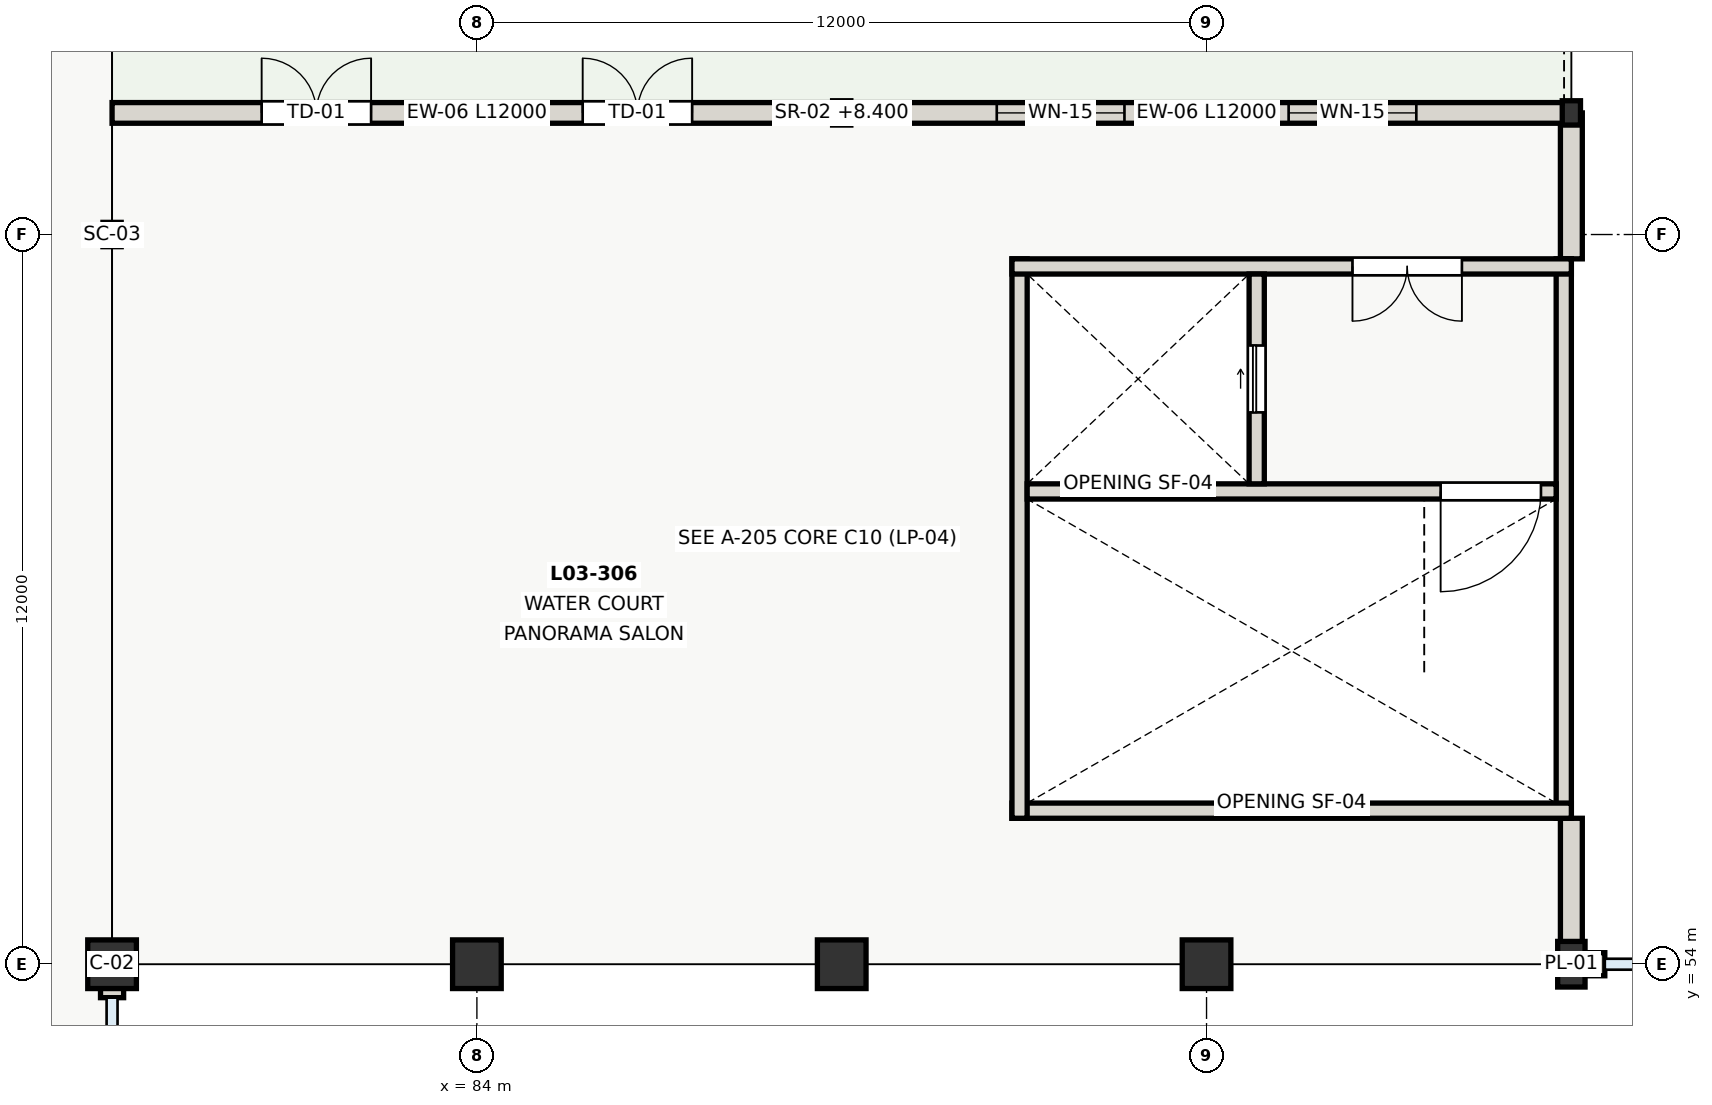
"""IFC4 building model, lengths in metres.
Left out: names, types, materials, properties, quantities, classifications, styles, units other than length and angle.
Written with IfcOpenShell. Run it as: python <this file> out.ifc"""

import sys

from ifc_helpers import new_model, si_unit, direction, frame, frame_2d, origin, origin_2d, place, context, subcontext, project, spatial, rectangle, i_section, extrude, element, fill, save


model = new_model("IFC4")
c1 = context("Model", 3, precision=1e-05, world=origin(), true_north=direction((0.0, 1.0)))
c2 = subcontext(c1, "Body", "Model", "MODEL_VIEW")
j1 = project(units=[si_unit("LENGTHUNIT", "METRE"), si_unit("PLANEANGLEUNIT", "RADIAN")], contexts=[c1])
p1 = place(None, origin())
s1 = spatial("IfcSite", under=j1, at=p1, CompositionType="ELEMENT")
p2 = place(p1, origin())
s2 = spatial("IfcBuilding", under=s1, at=p2, CompositionType="ELEMENT")
p3 = place(p2, frame((0.0, 0.0, 8.4)))
s3 = spatial("IfcBuildingStorey", under=s2, at=p3, CompositionType="ELEMENT", Elevation=8.4)
for number, where, z_axis, x_axis in (
    (1, (78.0, 54.0, 0.0), (0.0, 0.0, 1.0), (1.0, 0.0, 0.0)),
    (2, (84.0, 54.0, 0.0), (0.0, 0.0, 1.0), (1.0, 0.0, 0.0)),
    (3, (90.0, 54.0, 0.0), (0.0, 0.0, 1.0), (1.0, 0.0, 0.0)),
    (4, (96.0, 54.0, 0.0), (0.0, 0.0, 1.0), (1.0, 0.0, 0.0)),
):
    element("IfcColumn", number, at=place(p3, frame(where, z_axis=z_axis, x_axis=x_axis)), inside=s3, PredefinedType="COLUMN", context=c2, shape_type="SweptSolid", body=[
        extrude(rectangle(XDim=0.8, YDim=0.8, at=origin_2d()), origin(), (0.0, 0.0, 1.0), 4.8),
    ])
p4 = place(p3, frame((102.0, 54.0, 0.0), z_axis=(0.0, 0.0, 1.0), x_axis=(1.0, 0.0, 0.0)))
e5 = element("IfcColumn", 5, at=p4, inside=s3, PredefinedType="PILASTER", context=c2, shape_type="SweptSolid", body=[
    extrude(rectangle(XDim=0.45, YDim=0.75, at=origin_2d()), origin(), (0.0, 0.0, 1.0), 4.8),
])
for number, where, z_axis, x_axis in (
    (6, (78.0, 66.0, 0.0), (0.0, 0.0, 1.0), (1.0, 0.0, 0.0)),
    (7, (90.0, 68.0, 0.0), (0.0, 0.0, 1.0), (1.0, 0.0, 0.0)),
    (8, (102.0, 68.0, 0.0), (0.0, 0.0, 1.0), (1.0, 0.0, 0.0)),
):
    element("IfcColumn", number, at=place(p3, frame(where, z_axis=z_axis, x_axis=x_axis)), inside=s3, PredefinedType="COLUMN", context=c2, shape_type="SweptSolid", body=[
        extrude(i_section(OverallWidth=0.3, OverallDepth=0.4, WebThickness=0.013, FlangeThickness=0.024, at=origin_2d()), origin(), (0.0, 0.0, 1.0), 4.2),
    ])
p5 = place(p3, frame((102.182, 54.0, 0.0), z_axis=(0.0, 0.0, 1.0), x_axis=(1.0, 0.0, 0.0)))
e9 = element("IfcWall", 9, at=p5, inside=s3, PredefinedType="SOLIDWALL", context=c2, shape_type="SweptSolid", body=[
    extrude(rectangle(XDim=0.368, YDim=0.38, at=frame_2d((0.184, 0.0))), origin(), (0.0, 0.0, 1.0), 3.56),
])
p6 = place(p3, frame((78.0, 53.45, 0.0), z_axis=(0.0, 0.0, 1.0), x_axis=(0.0, 1.0, 0.0)))
e10 = element("IfcWall", 10, at=p6, inside=s3, PredefinedType="SOLIDWALL", context=c2, shape_type="SweptSolid", body=[
    extrude(rectangle(XDim=0.55, YDim=0.38, at=frame_2d((0.275, 0.0))), origin(), (0.0, 0.0, 1.0), 4.8),
])
for number, where, z_axis, x_axis in (
    (11, (102.0, 56.4, 0.0), (0.0, 0.0, 1.0), (0.0, -1.0, 0.0)),
    (12, (102.0, 68.0, 0.0), (0.0, 0.0, 1.0), (0.0, -1.0, 0.0)),
):
    element("IfcWall", number, at=place(p3, frame(where, z_axis=z_axis, x_axis=x_axis)), inside=s3, PredefinedType="SOLIDWALL", context=c2, shape_type="SweptSolid", body=[
        extrude(rectangle(XDim=2.4, YDim=0.36, at=frame_2d((1.2, 0.0))), origin(), (0.0, 0.0, 1.0), 4.2),
    ])
p7 = place(p3, frame((78.0, 68.0, 0.0), z_axis=(0.0, 0.0, 1.0), x_axis=(1.0, 0.0, 0.0)))
e13 = element("IfcWall", 13, at=p7, inside=s3, PredefinedType="SOLIDWALL", context=c2, shape_type="SweptSolid", body=[
    extrude(rectangle(XDim=12.0, YDim=0.34, at=frame_2d((6.0, 0.0))), origin(), (0.0, 0.0, 1.0), 4.2),
])
p8 = place(p7, frame((2.46, 0.0, 0.0)))
e14 = element("IfcOpeningElement", 14, at=p8, cuts=e13, PredefinedType="OPENING", context=c2, shape_type="SweptSolid", body=[
    extrude(rectangle(XDim=1.8, YDim=2.2, at=frame_2d((0.9, 1.1))), frame((0.0, 0.18, 0.0), z_axis=(0.0, -1.0, 0.0), x_axis=(1.0, 0.0, 0.0)), (0.0, 0.0, 1.0), 0.36),
])
p9 = place(p7, frame((7.74, 0.0, 0.0)))
e15 = element("IfcOpeningElement", 15, at=p9, cuts=e13, PredefinedType="OPENING", context=c2, shape_type="SweptSolid", body=[
    extrude(rectangle(XDim=1.8, YDim=2.2, at=frame_2d((0.9, 1.1))), frame((0.0, 0.18, 0.0), z_axis=(0.0, -1.0, 0.0), x_axis=(1.0, 0.0, 0.0)), (0.0, 0.0, 1.0), 0.36),
])
p10 = place(p3, frame((90.0, 68.0, 0.0), z_axis=(0.0, 0.0, 1.0), x_axis=(1.0, 0.0, 0.0)))
e16 = element("IfcWall", 16, at=p10, inside=s3, PredefinedType="SOLIDWALL", context=c2, shape_type="SweptSolid", body=[
    extrude(rectangle(XDim=12.0, YDim=0.34, at=frame_2d((6.0, 0.0))), origin(), (0.0, 0.0, 1.0), 4.2),
])
p11 = place(p10, frame((2.55, 0.0, 0.9)))
e17 = element("IfcOpeningElement", 17, at=p11, cuts=e16, PredefinedType="OPENING", context=c2, shape_type="SweptSolid", body=[
    extrude(rectangle(XDim=2.1, YDim=1.95, at=frame_2d((1.05, 0.975))), frame((0.0, 0.18, 0.0), z_axis=(0.0, -1.0, 0.0), x_axis=(1.0, 0.0, 0.0)), (0.0, 0.0, 1.0), 0.36),
])
p12 = place(p10, frame((7.35, 0.0, 0.9)))
e18 = element("IfcOpeningElement", 18, at=p12, cuts=e16, PredefinedType="OPENING", context=c2, shape_type="SweptSolid", body=[
    extrude(rectangle(XDim=2.1, YDim=1.95, at=frame_2d((1.05, 0.975))), frame((0.0, 0.18, 0.0), z_axis=(0.0, -1.0, 0.0), x_axis=(1.0, 0.0, 0.0)), (0.0, 0.0, 1.0), 0.36),
])
p13 = place(p3, frame((101.875, 65.6, 0.0), z_axis=(0.0, 0.0, 1.0), x_axis=(0.0, -1.0, 0.0)))
e19 = element("IfcWall", 19, at=p13, inside=s3, PredefinedType="SHEAR", context=c2, shape_type="SweptSolid", body=[
    extrude(rectangle(XDim=9.2, YDim=0.25, at=frame_2d((4.6, 0.0))), origin(), (0.0, 0.0, 1.0), 5.6),
])
p14 = place(p3, frame((102.0, 56.525, 0.0), z_axis=(0.0, 0.0, 1.0), x_axis=(-1.0, 0.0, 0.0)))
e20 = element("IfcWall", 20, at=p14, inside=s3, PredefinedType="SHEAR", context=c2, shape_type="SweptSolid", body=[
    extrude(rectangle(XDim=9.2, YDim=0.25, at=frame_2d((4.6, 0.0))), origin(), (0.0, 0.0, 1.0), 5.6),
])
p15 = place(p3, frame((92.925, 56.4, 0.0), z_axis=(0.0, 0.0, 1.0), x_axis=(0.0, 1.0, 0.0)))
e21 = element("IfcWall", 21, at=p15, inside=s3, PredefinedType="SHEAR", context=c2, shape_type="SweptSolid", body=[
    extrude(rectangle(XDim=9.2, YDim=0.25, at=frame_2d((4.6, 0.0))), origin(), (0.0, 0.0, 1.0), 5.6),
])
p16 = place(p3, frame((102.0, 65.475, 0.0), z_axis=(0.0, 0.0, 1.0), x_axis=(-1.0, 0.0, 0.0)))
e22 = element("IfcWall", 22, at=p16, inside=s3, PredefinedType="SHEAR", context=c2, shape_type="SweptSolid", body=[
    extrude(rectangle(XDim=9.2, YDim=0.25, at=frame_2d((4.6, 0.0))), origin(), (0.0, 0.0, 1.0), 5.6),
])
p17 = place(p16, frame((1.8, 0.0, 0.0)))
e23 = element("IfcOpeningElement", 23, at=p17, cuts=e22, PredefinedType="OPENING", context=c2, shape_type="SweptSolid", body=[
    extrude(rectangle(XDim=1.8, YDim=2.15, at=frame_2d((0.9, 1.075))), frame((0.0, 0.135, 0.0), z_axis=(0.0, -1.0, 0.0), x_axis=(1.0, 0.0, 0.0)), (0.0, 0.0, 1.0), 0.27),
])
p18 = place(p3, frame((101.75, 61.775, 0.0), z_axis=(0.0, 0.0, 1.0), x_axis=(-1.0, 0.0, 0.0)))
e24 = element("IfcWall", 24, at=p18, inside=s3, PredefinedType="SHEAR", context=c2, shape_type="SweptSolid", body=[
    extrude(rectangle(XDim=8.7, YDim=0.25, at=frame_2d((4.35, 0.0))), origin(), (0.0, 0.0, 1.0), 5.6),
])
p19 = place(p18, frame((0.25, 0.0, 0.0)))
e25 = element("IfcOpeningElement", 25, at=p19, cuts=e24, PredefinedType="OPENING", context=c2, shape_type="SweptSolid", body=[
    extrude(rectangle(XDim=1.65, YDim=2.1, at=frame_2d((0.825, 1.05))), frame((0.0, 0.135, 0.0), z_axis=(0.0, -1.0, 0.0), x_axis=(1.0, 0.0, 0.0)), (0.0, 0.0, 1.0), 0.27),
])
p20 = place(p3, frame((96.825, 61.9, 0.0), z_axis=(0.0, 0.0, 1.0), x_axis=(0.0, 1.0, 0.0)))
e26 = element("IfcWall", 26, at=p20, inside=s3, PredefinedType="SHEAR", context=c2, shape_type="SweptSolid", body=[
    extrude(rectangle(XDim=3.45, YDim=0.25, at=frame_2d((1.725, 0.0))), origin(), (0.0, 0.0, 1.0), 5.6),
])
p21 = place(p20, frame((1.175, 0.0, 0.0)))
e27 = element("IfcOpeningElement", 27, at=p21, cuts=e26, PredefinedType="OPENING", context=c2, shape_type="SweptSolid", body=[
    extrude(rectangle(XDim=1.1, YDim=2.1, at=frame_2d((0.55, 1.05))), frame((0.0, 0.135, 0.0), z_axis=(0.0, -1.0, 0.0), x_axis=(1.0, 0.0, 0.0)), (0.0, 0.0, 1.0), 0.27),
])
p22 = place(p8, origin())
e28 = element("IfcDoor", 28, at=p22, inside=s3, OperationType="DOUBLE_DOOR_SINGLE_SWING", PredefinedType="DOOR", context=c2, shape_type="SweptSolid", body=[
    extrude(rectangle(XDim=1.8, YDim=2.2, at=frame_2d((0.9, 1.1))), frame((0.0, 0.025, 0.0), z_axis=(0.0, -1.0, 0.0), x_axis=(1.0, 0.0, 0.0)), (0.0, 0.0, 1.0), 0.05),
])
fill(e14, e28)
p23 = place(p9, origin())
e29 = element("IfcDoor", 29, at=p23, inside=s3, OperationType="DOUBLE_DOOR_SINGLE_SWING", PredefinedType="DOOR", context=c2, shape_type="SweptSolid", body=[
    extrude(rectangle(XDim=1.8, YDim=2.2, at=frame_2d((0.9, 1.1))), frame((0.0, 0.025, 0.0), z_axis=(0.0, -1.0, 0.0), x_axis=(1.0, 0.0, 0.0)), (0.0, 0.0, 1.0), 0.05),
])
fill(e15, e29)
p24 = place(p11, origin())
e30 = element("IfcWindow", 30, at=p24, inside=s3, PartitioningType="SINGLE_PANEL", PredefinedType="WINDOW", context=c2, shape_type="SweptSolid", body=[
    extrude(rectangle(XDim=2.1, YDim=1.95, at=frame_2d((1.05, 0.975))), frame((0.0, 0.03, 0.0), z_axis=(0.0, -1.0, 0.0), x_axis=(1.0, 0.0, 0.0)), (0.0, 0.0, 1.0), 0.06),
])
fill(e17, e30)
p25 = place(p12, origin())
e31 = element("IfcWindow", 31, at=p25, inside=s3, PartitioningType="SINGLE_PANEL", PredefinedType="WINDOW", context=c2, shape_type="SweptSolid", body=[
    extrude(rectangle(XDim=2.1, YDim=1.95, at=frame_2d((1.05, 0.975))), frame((0.0, 0.03, 0.0), z_axis=(0.0, -1.0, 0.0), x_axis=(1.0, 0.0, 0.0)), (0.0, 0.0, 1.0), 0.06),
])
fill(e18, e31)
p26 = place(p17, origin())
e32 = element("IfcDoor", 32, at=p26, inside=s3, OperationType="DOUBLE_DOOR_SINGLE_SWING", PredefinedType="DOOR", context=c2, shape_type="SweptSolid", body=[
    extrude(rectangle(XDim=1.8, YDim=2.15, at=frame_2d((0.9, 1.075))), frame((0.0, 0.025, 0.0), z_axis=(0.0, -1.0, 0.0), x_axis=(1.0, 0.0, 0.0)), (0.0, 0.0, 1.0), 0.05),
])
fill(e23, e32)
p27 = place(p19, origin())
e33 = element("IfcDoor", 33, at=p27, inside=s3, OperationType="SINGLE_SWING_RIGHT", PredefinedType="DOOR", context=c2, shape_type="SweptSolid", body=[
    extrude(rectangle(XDim=1.65, YDim=2.1, at=frame_2d((0.825, 1.05))), frame((0.0, 0.025, 0.0), z_axis=(0.0, -1.0, 0.0), x_axis=(1.0, 0.0, 0.0)), (0.0, 0.0, 1.0), 0.05),
])
fill(e25, e33)
p28 = place(p21, origin())
e34 = element("IfcDoor", 34, at=p28, inside=s3, OperationType="SLIDING_TO_RIGHT", PredefinedType="DOOR", context=c2, shape_type="SweptSolid", body=[
    extrude(rectangle(XDim=1.1, YDim=2.1, at=frame_2d((0.55, 1.05))), frame((0.0, 0.025, 0.0), z_axis=(0.0, -1.0, 0.0), x_axis=(1.0, 0.0, 0.0)), (0.0, 0.0, 1.0), 0.05),
])
fill(e27, e34)
save(model, sys.argv[1])
